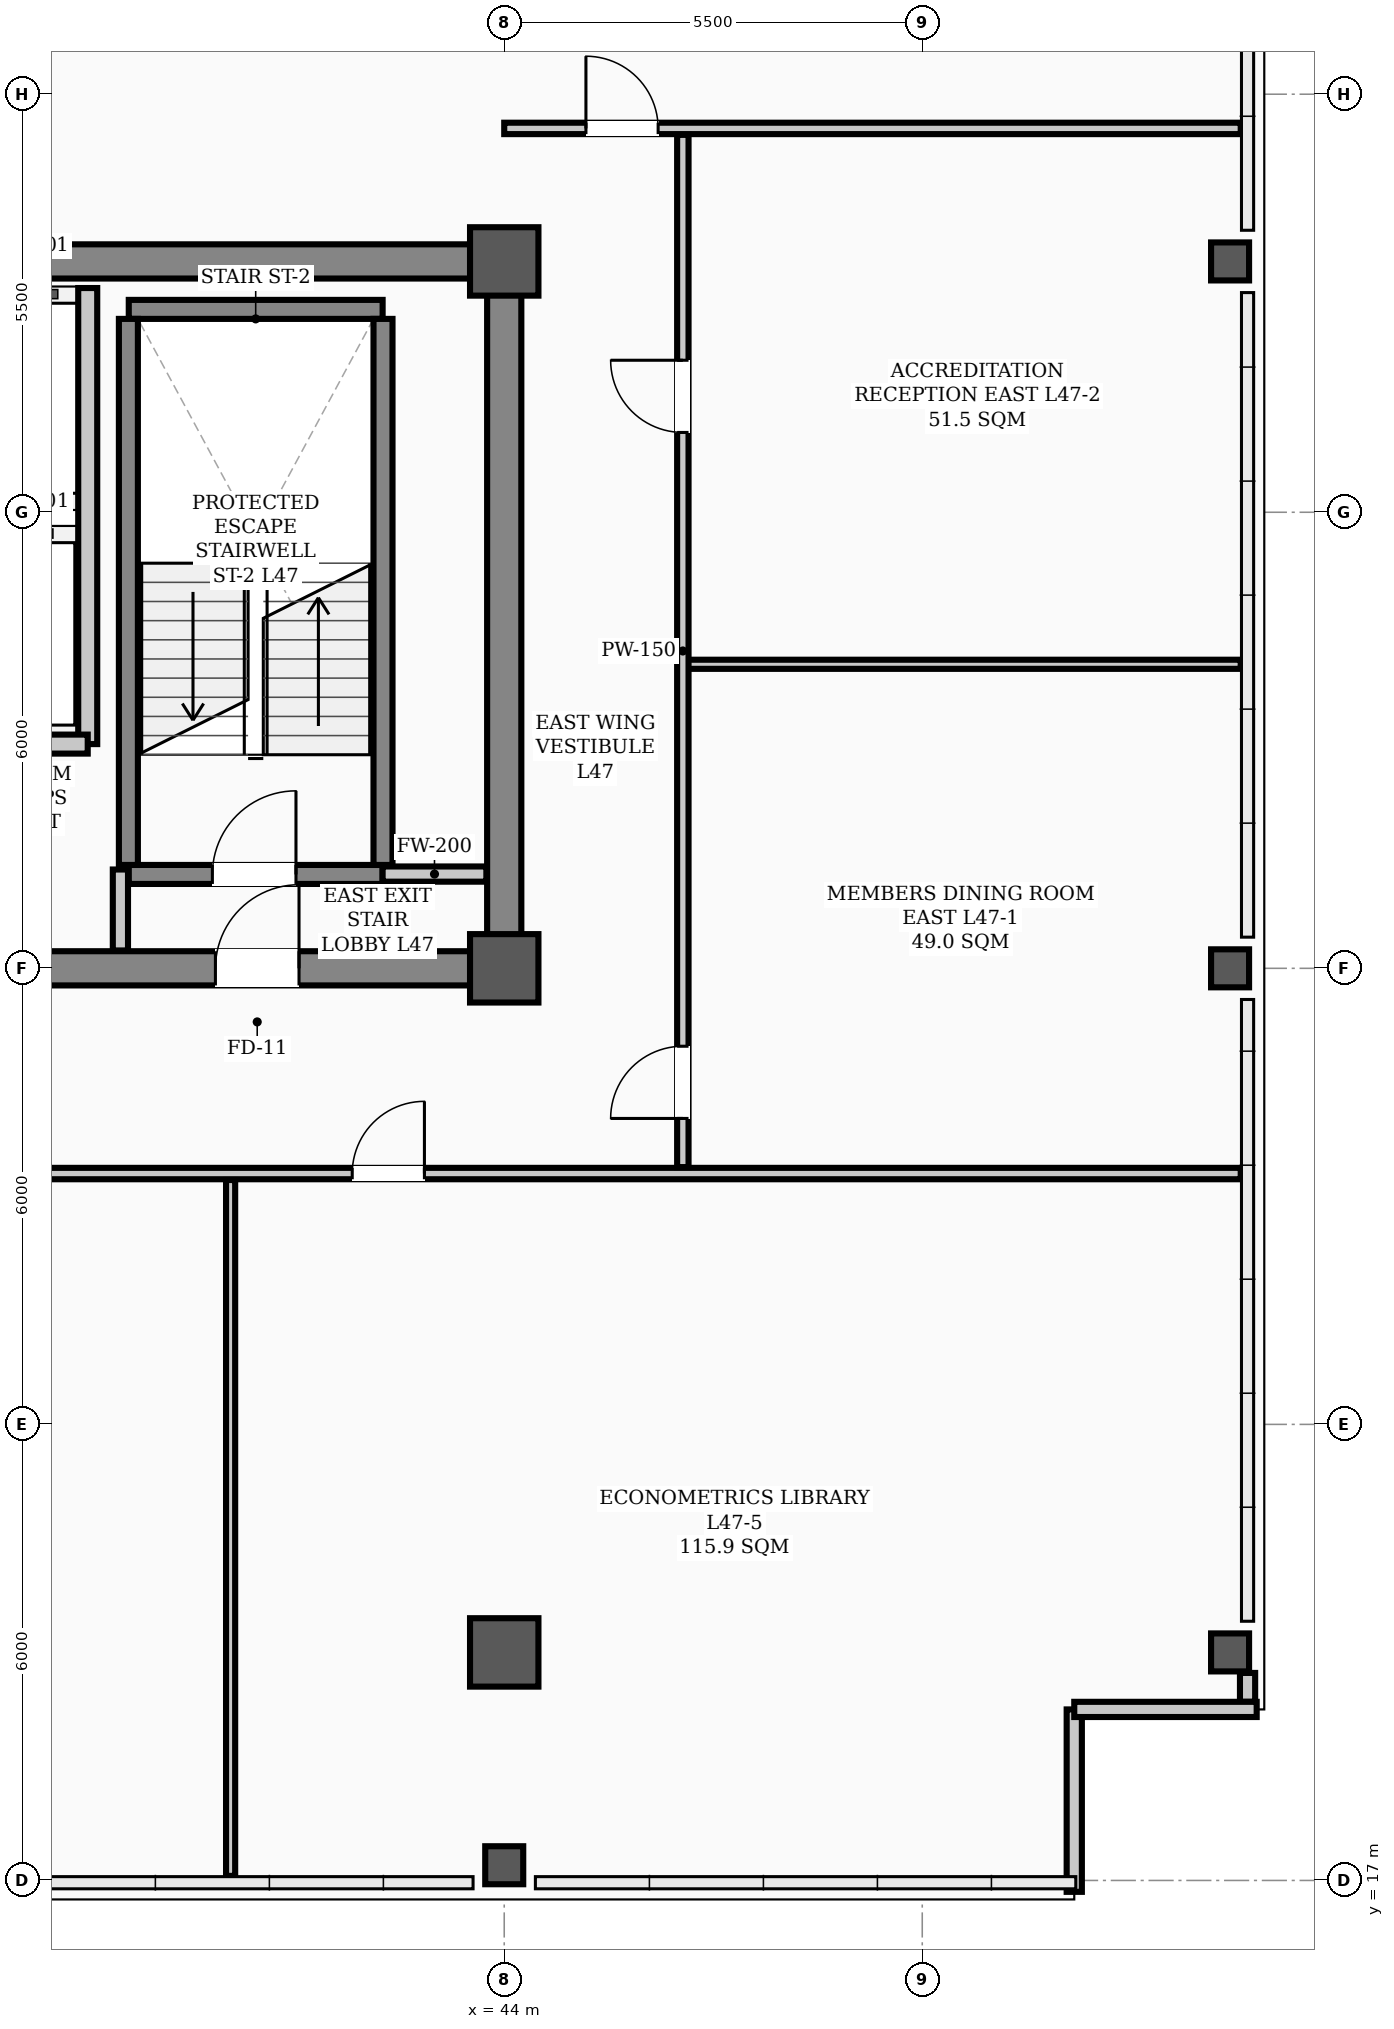
"""IFC4 building model, lengths in metres.
Left out: names, types, materials, properties, quantities, classifications, styles, units other than length and angle.
Written with IfcOpenShell. Run it as: python <this file> out.ifc"""

import sys

from ifc_helpers import new_model, si_unit, direction, frame, frame_2d, origin, origin_2d, place, context, subcontext, project, spatial, rectangle, hollow_rectangle, extrude, element, fill, save


model = new_model("IFC4")
c1 = context("Model", 3, precision=1e-05, world=origin(), true_north=direction((0.0, 1.0)))
c2 = subcontext(c1, "Body", "Model", "MODEL_VIEW")
j1 = project(units=[si_unit("LENGTHUNIT", "METRE"), si_unit("PLANEANGLEUNIT", "RADIAN")], contexts=[c1])
p1 = place(None, origin())
s1 = spatial("IfcSite", under=j1, at=p1, CompositionType="ELEMENT")
p2 = place(p1, origin())
s2 = spatial("IfcBuilding", under=s1, at=p2, CompositionType="ELEMENT")
p3 = place(p2, frame((0.0, 0.0, 189.0)))
s3 = spatial("IfcBuildingStorey", under=s2, at=p3, CompositionType="ELEMENT", Elevation=189.0)
for number, where, z_axis, x_axis in (
    (1, (44.0, 29.0, 0.0), (0.0, 0.0, 1.0), (1.0, 0.0, 0.0)),
    (2, (44.0, 38.3, 0.0), (0.0, 0.0, 1.0), (1.0, 0.0, 0.0)),
    (3, (44.0, 20.0, 0.0), (0.0, 0.0, 1.0), (1.0, 0.0, 0.0)),
):
    element("IfcColumn", number, at=place(p3, frame(where, z_axis=z_axis, x_axis=x_axis)), inside=s3, PredefinedType="COLUMN", context=c2, shape_type="SweptSolid", body=[
        extrude(hollow_rectangle(XDim=0.9, YDim=0.9, WallThickness=0.035, InnerFilletRadius=0.017, OuterFilletRadius=0.052, at=origin_2d()), origin(), (0.0, 0.0, 1.0), 3.9),
    ])
for number, where, z_axis, x_axis in (
    (4, (44.0, 17.2, 0.0), (0.0, 0.0, 1.0), (1.0, 0.0, 0.0)),
    (5, (53.55, 20.0, 0.0), (0.0, 0.0, 1.0), (1.0, 0.0, 0.0)),
    (6, (53.55, 29.0, 0.0), (0.0, 0.0, 1.0), (1.0, 0.0, 0.0)),
    (7, (53.55, 38.3, 0.0), (0.0, 0.0, 1.0), (1.0, 0.0, 0.0)),
):
    element("IfcColumn", number, at=place(p3, frame(where, z_axis=z_axis, x_axis=x_axis)), inside=s3, PredefinedType="COLUMN", context=c2, shape_type="SweptSolid", body=[
        extrude(hollow_rectangle(XDim=0.5, YDim=0.5, WallThickness=0.024, InnerFilletRadius=0.012, OuterFilletRadius=0.036, at=origin_2d()), origin(), (0.0, 0.0, 1.0), 3.9),
    ])
p4 = place(p3, frame((53.78, 19.35, 0.0), z_axis=(0.0, 0.0, 1.0), x_axis=(0.0, 1.0, 0.0)))
e8 = element("IfcWall", 8, at=p4, inside=s3, PredefinedType="PARAPET", context=c2, shape_type="SweptSolid", body=[
    extrude(rectangle(XDim=0.38, YDim=0.2, at=frame_2d((0.19, 0.0))), origin(), (0.0, 0.0, 1.0), 1.2),
])
for number, where, z_axis, x_axis in (
    (9, (51.5, 16.85, 0.0), (0.0, 0.0, 1.0), (0.0, 1.0, 0.0)),
    (10, (51.5, 19.25, 0.0), (0.0, 0.0, 1.0), (1.0, 0.0, 0.0)),
):
    element("IfcWall", number, at=place(p3, frame(where, z_axis=z_axis, x_axis=x_axis)), inside=s3, PredefinedType="PARAPET", context=c2, shape_type="SweptSolid", body=[
        extrude(rectangle(XDim=2.4, YDim=0.2, at=frame_2d((1.2, 0.0))), origin(), (0.0, 0.0, 1.0), 1.2),
    ])
p5 = place(p3, frame((13.5, 29.0, 0.0), z_axis=(0.0, 0.0, 1.0), x_axis=(1.0, 0.0, 0.0)))
e11 = element("IfcWall", 11, at=p5, inside=s3, PredefinedType="SHEAR", context=c2, shape_type="SweptSolid", body=[
    extrude(rectangle(XDim=30.5, YDim=0.45, at=frame_2d((15.25, 0.0))), origin(), (0.0, 0.0, 1.0), 3.72),
])
p6 = place(p5, frame((1.75, 0.0, 0.0)))
e12 = element("IfcOpeningElement", 12, at=p6, cuts=e11, PredefinedType="OPENING", context=c2, shape_type="SweptSolid", body=[
    extrude(rectangle(XDim=1.1, YDim=2.08, at=frame_2d((0.55, 1.04))), frame((0.0, 0.235, 0.0), z_axis=(0.0, -1.0, 0.0), x_axis=(1.0, 0.0, 0.0)), (0.0, 0.0, 1.0), 0.47),
])
p7 = place(p5, frame((26.7, 0.0, 0.0)))
e13 = element("IfcOpeningElement", 13, at=p7, cuts=e11, PredefinedType="OPENING", context=c2, shape_type="SweptSolid", body=[
    extrude(rectangle(XDim=1.1, YDim=2.08, at=frame_2d((0.55, 1.04))), frame((0.0, 0.235, 0.0), z_axis=(0.0, -1.0, 0.0), x_axis=(1.0, 0.0, 0.0)), (0.0, 0.0, 1.0), 0.47),
])
p8 = place(p5, frame((6.8, 0.0, 0.0)))
e14 = element("IfcOpeningElement", 14, at=p8, cuts=e11, PredefinedType="OPENING", context=c2, shape_type="SweptSolid", body=[
    extrude(rectangle(XDim=1.1, YDim=2.08, at=frame_2d((0.55, 1.04))), frame((0.0, 0.235, 0.0), z_axis=(0.0, -1.0, 0.0), x_axis=(1.0, 0.0, 0.0)), (0.0, 0.0, 1.0), 0.47),
])
p9 = place(p5, frame((13.2, 0.0, 0.0)))
e15 = element("IfcOpeningElement", 15, at=p9, cuts=e11, PredefinedType="OPENING", context=c2, shape_type="SweptSolid", body=[
    extrude(rectangle(XDim=1.6, YDim=2.08, at=frame_2d((0.8, 1.04))), frame((0.0, 0.235, 0.0), z_axis=(0.0, -1.0, 0.0), x_axis=(1.0, 0.0, 0.0)), (0.0, 0.0, 1.0), 0.47),
])
p10 = place(p5, frame((19.6, 0.0, 0.0)))
e16 = element("IfcOpeningElement", 16, at=p10, cuts=e11, PredefinedType="OPENING", context=c2, shape_type="SweptSolid", body=[
    extrude(rectangle(XDim=0.9, YDim=2.08, at=frame_2d((0.45, 1.04))), frame((0.0, 0.235, 0.0), z_axis=(0.0, -1.0, 0.0), x_axis=(1.0, 0.0, 0.0)), (0.0, 0.0, 1.0), 0.47),
])
p11 = place(p5, frame((21.6, 0.0, 0.0)))
e17 = element("IfcOpeningElement", 17, at=p11, cuts=e11, PredefinedType="OPENING", context=c2, shape_type="SweptSolid", body=[
    extrude(rectangle(XDim=0.9, YDim=2.08, at=frame_2d((0.45, 1.04))), frame((0.0, 0.235, 0.0), z_axis=(0.0, -1.0, 0.0), x_axis=(1.0, 0.0, 0.0)), (0.0, 0.0, 1.0), 0.47),
])
p12 = place(p3, frame((13.5, 38.3, 0.0), z_axis=(0.0, 0.0, 1.0), x_axis=(1.0, 0.0, 0.0)))
e18 = element("IfcWall", 18, at=p12, inside=s3, PredefinedType="SHEAR", context=c2, shape_type="SweptSolid", body=[
    extrude(rectangle(XDim=30.5, YDim=0.45, at=frame_2d((15.25, 0.0))), origin(), (0.0, 0.0, 1.0), 3.72),
])
p13 = place(p3, frame((44.0, 29.35, 0.0), z_axis=(0.0, 0.0, 1.0), x_axis=(0.0, 1.0, 0.0)))
e19 = element("IfcWall", 19, at=p13, inside=s3, PredefinedType="SHEAR", context=c2, shape_type="SweptSolid", body=[
    extrude(rectangle(XDim=8.6, YDim=0.45, at=frame_2d((4.3, 0.0))), origin(), (0.0, 0.0, 1.0), 3.72),
])
p14 = place(p3, frame((39.06, 30.235, 0.0), z_axis=(0.0, 0.0, 1.0), x_axis=(1.0, 0.0, 0.0)))
e20 = element("IfcWall", 20, at=p14, inside=s3, PredefinedType="STANDARD", context=c2, shape_type="SweptSolid", body=[
    extrude(rectangle(XDim=3.34, YDim=0.25, at=frame_2d((1.67, 0.0))), origin(), (0.0, 0.0, 1.0), 3.72),
])
p15 = place(p14, frame((1.1, 0.0, 0.0)))
e21 = element("IfcOpeningElement", 21, at=p15, cuts=e20, PredefinedType="OPENING", context=c2, shape_type="SweptSolid", body=[
    extrude(rectangle(XDim=1.1, YDim=2.08, at=frame_2d((0.55, 1.04))), frame((0.0, 0.135, 0.0), z_axis=(0.0, -1.0, 0.0), x_axis=(1.0, 0.0, 0.0)), (0.0, 0.0, 1.0), 0.27),
])
p16 = place(p3, frame((39.06, 37.669, 0.0), z_axis=(0.0, 0.0, 1.0), x_axis=(1.0, 0.0, 0.0)))
e22 = element("IfcWall", 22, at=p16, inside=s3, PredefinedType="STANDARD", context=c2, shape_type="SweptSolid", body=[
    extrude(rectangle(XDim=3.34, YDim=0.25, at=frame_2d((1.67, 0.0))), origin(), (0.0, 0.0, 1.0), 3.72),
])
for number, where, z_axis, x_axis in (
    (23, (39.055, 30.36, 0.0), (0.0, 0.0, 1.0), (0.0, 1.0, 0.0)),
    (24, (42.405, 30.36, 0.0), (0.0, 0.0, 1.0), (0.0, 1.0, 0.0)),
):
    element("IfcWall", number, at=place(p3, frame(where, z_axis=z_axis, x_axis=x_axis)), inside=s3, PredefinedType="STANDARD", context=c2, shape_type="SweptSolid", body=[
        extrude(rectangle(XDim=7.184, YDim=0.25, at=frame_2d((3.592, 0.0))), origin(), (0.0, 0.0, 1.0), 3.72),
    ])
p17 = place(p3, frame((38.52, 31.95, 0.0), z_axis=(0.0, 0.0, 1.0), x_axis=(0.0, 1.0, 0.0)))
e25 = element("IfcWall", 25, at=p17, inside=s3, PredefinedType="STANDARD", context=c2, shape_type="SweptSolid", body=[
    extrude(rectangle(XDim=6.0, YDim=0.25, at=frame_2d((3.0, 0.0))), origin(), (0.0, 0.0, 1.0), 3.35),
])
p18 = place(p3, frame((36.62, 31.95, 0.0), z_axis=(0.0, 0.0, 1.0), x_axis=(1.0, 0.0, 0.0)))
e26 = element("IfcWall", 26, at=p18, inside=s3, PredefinedType="STANDARD", context=c2, shape_type="SweptSolid", body=[
    extrude(rectangle(XDim=1.9, YDim=0.25, at=frame_2d((0.95, 0.0))), origin(), (0.0, 0.0, 1.0), 3.48),
])
p19 = place(p3, frame((42.4, 30.24, 0.0), z_axis=(0.0, 0.0, 1.0), x_axis=(1.0, 0.0, 0.0)))
e27 = element("IfcWall", 27, at=p19, inside=s3, PredefinedType="STANDARD", context=c2, shape_type="SweptSolid", body=[
    extrude(rectangle(XDim=1.365, YDim=0.2, at=frame_2d((0.683, 0.0))), origin(), (0.0, 0.0, 1.0), 3.2),
])
p20 = place(p3, frame((10.31, 26.3, 0.0), z_axis=(0.0, 0.0, 1.0), x_axis=(1.0, 0.0, 0.0)))
e28 = element("IfcWall", 28, at=p20, inside=s3, PredefinedType="PARTITIONING", context=c2, shape_type="SweptSolid", body=[
    extrude(rectangle(XDim=43.38, YDim=0.15, at=frame_2d((21.69, 0.0))), origin(), (0.0, 0.0, 1.0), 3.2),
])
p21 = place(p20, frame((0.97, 0.0, 0.0)))
e29 = element("IfcOpeningElement", 29, at=p21, cuts=e28, PredefinedType="OPENING", context=c2, shape_type="SweptSolid", body=[
    extrude(rectangle(XDim=0.95, YDim=2.08, at=frame_2d((0.475, 1.04))), frame((0.0, 0.085, 0.0), z_axis=(0.0, -1.0, 0.0), x_axis=(1.0, 0.0, 0.0)), (0.0, 0.0, 1.0), 0.17),
])
p22 = place(p20, frame((8.315, 0.0, 0.0)))
e30 = element("IfcOpeningElement", 30, at=p22, cuts=e28, PredefinedType="OPENING", context=c2, shape_type="SweptSolid", body=[
    extrude(rectangle(XDim=0.95, YDim=2.08, at=frame_2d((0.475, 1.04))), frame((0.0, 0.085, 0.0), z_axis=(0.0, -1.0, 0.0), x_axis=(1.0, 0.0, 0.0)), (0.0, 0.0, 1.0), 0.17),
])
p23 = place(p20, frame((16.815, 0.0, 0.0)))
e31 = element("IfcOpeningElement", 31, at=p23, cuts=e28, PredefinedType="OPENING", context=c2, shape_type="SweptSolid", body=[
    extrude(rectangle(XDim=0.95, YDim=2.08, at=frame_2d((0.475, 1.04))), frame((0.0, 0.085, 0.0), z_axis=(0.0, -1.0, 0.0), x_axis=(1.0, 0.0, 0.0)), (0.0, 0.0, 1.0), 0.17),
])
p24 = place(p20, frame((24.515, 0.0, 0.0)))
e32 = element("IfcOpeningElement", 32, at=p24, cuts=e28, PredefinedType="OPENING", context=c2, shape_type="SweptSolid", body=[
    extrude(rectangle(XDim=0.95, YDim=2.08, at=frame_2d((0.475, 1.04))), frame((0.0, 0.085, 0.0), z_axis=(0.0, -1.0, 0.0), x_axis=(1.0, 0.0, 0.0)), (0.0, 0.0, 1.0), 0.17),
])
p25 = place(p20, frame((31.69, 0.0, 0.0)))
e33 = element("IfcOpeningElement", 33, at=p25, cuts=e28, PredefinedType="OPENING", context=c2, shape_type="SweptSolid", body=[
    extrude(rectangle(XDim=0.95, YDim=2.08, at=frame_2d((0.475, 1.04))), frame((0.0, 0.085, 0.0), z_axis=(0.0, -1.0, 0.0), x_axis=(1.0, 0.0, 0.0)), (0.0, 0.0, 1.0), 0.17),
])
p26 = place(p3, frame((46.35, 33.0, 0.0), z_axis=(0.0, 0.0, 1.0), x_axis=(1.0, 0.0, 0.0)))
e34 = element("IfcWall", 34, at=p26, inside=s3, PredefinedType="PARTITIONING", context=c2, shape_type="SweptSolid", body=[
    extrude(rectangle(XDim=7.34, YDim=0.12, at=frame_2d((3.67, 0.0))), origin(), (0.0, 0.0, 1.0), 3.212),
])
p27 = place(p3, frame((44.0, 40.05, 0.0), z_axis=(0.0, 0.0, 1.0), x_axis=(1.0, 0.0, 0.0)))
e35 = element("IfcWall", 35, at=p27, inside=s3, PredefinedType="PARTITIONING", context=c2, shape_type="SweptSolid", body=[
    extrude(rectangle(XDim=9.69, YDim=0.15, at=frame_2d((4.845, 0.0))), origin(), (0.0, 0.0, 1.0), 3.2),
])
p28 = place(p27, frame((1.075, 0.0, 0.0)))
e36 = element("IfcOpeningElement", 36, at=p28, cuts=e35, PredefinedType="OPENING", context=c2, shape_type="SweptSolid", body=[
    extrude(rectangle(XDim=0.95, YDim=2.08, at=frame_2d((0.475, 1.04))), frame((0.0, 0.085, 0.0), z_axis=(0.0, -1.0, 0.0), x_axis=(1.0, 0.0, 0.0)), (0.0, 0.0, 1.0), 0.17),
])
p29 = place(p3, frame((38.95, 29.235, 0.0), z_axis=(0.0, 0.0, 1.0), x_axis=(0.0, 1.0, 0.0)))
e37 = element("IfcWall", 37, at=p29, inside=s3, PredefinedType="STANDARD", context=c2, shape_type="SweptSolid", body=[
    extrude(rectangle(XDim=1.065, YDim=0.2, at=frame_2d((0.532, 0.0))), origin(), (0.0, 0.0, 1.0), 3.35),
])
p30 = place(p3, frame((46.35, 26.385, 0.0), z_axis=(0.0, 0.0, 1.0), x_axis=(0.0, 1.0, 0.0)))
e38 = element("IfcWall", 38, at=p30, inside=s3, PredefinedType="PARTITIONING", context=c2, shape_type="SweptSolid", body=[
    extrude(rectangle(XDim=13.58, YDim=0.15, at=frame_2d((6.79, 0.0))), origin(), (0.0, 0.0, 1.0), 3.1),
])
p31 = place(p30, frame((0.64, 0.0, 0.0)))
e39 = element("IfcOpeningElement", 39, at=p31, cuts=e38, PredefinedType="OPENING", context=c2, shape_type="SweptSolid", body=[
    extrude(rectangle(XDim=0.95, YDim=2.08, at=frame_2d((0.475, 1.04))), frame((0.0, 0.085, 0.0), z_axis=(0.0, -1.0, 0.0), x_axis=(1.0, 0.0, 0.0)), (0.0, 0.0, 1.0), 0.17),
])
p32 = place(p30, frame((9.665, 0.0, 0.0)))
e40 = element("IfcOpeningElement", 40, at=p32, cuts=e38, PredefinedType="OPENING", context=c2, shape_type="SweptSolid", body=[
    extrude(rectangle(XDim=0.95, YDim=2.08, at=frame_2d((0.475, 1.04))), frame((0.0, 0.085, 0.0), z_axis=(0.0, -1.0, 0.0), x_axis=(1.0, 0.0, 0.0)), (0.0, 0.0, 1.0), 0.17),
])
p33 = place(p3, frame((40.4, 17.06, 0.0), z_axis=(0.0, 0.0, 1.0), x_axis=(0.0, 1.0, 0.0)))
e41 = element("IfcWall", 41, at=p33, inside=s3, PredefinedType="PARTITIONING", context=c2, shape_type="SweptSolid", body=[
    extrude(rectangle(XDim=9.155, YDim=0.12, at=frame_2d((4.578, 0.0))), origin(), (0.0, 0.0, 1.0), 3.1),
])
p34 = place(p15, origin())
e42 = element("IfcDoor", 42, at=p34, inside=s3, OperationType="SINGLE_SWING_RIGHT", PredefinedType="DOOR", context=c2, shape_type="SweptSolid", body=[
    extrude(rectangle(XDim=1.1, YDim=2.08, at=frame_2d((0.55, 1.04))), frame((0.0, 0.025, 0.0), z_axis=(0.0, -1.0, 0.0), x_axis=(1.0, 0.0, 0.0)), (0.0, 0.0, 1.0), 0.05),
])
fill(e21, e42)
p35 = place(p7, origin())
e43 = element("IfcDoor", 43, at=p35, inside=s3, OperationType="SINGLE_SWING_RIGHT", PredefinedType="DOOR", context=c2, shape_type="SweptSolid", body=[
    extrude(rectangle(XDim=1.1, YDim=2.08, at=frame_2d((0.55, 1.04))), frame((0.0, 0.025, 0.0), z_axis=(0.0, -1.0, 0.0), x_axis=(1.0, 0.0, 0.0)), (0.0, 0.0, 1.0), 0.05),
])
fill(e13, e43)
p36 = place(p25, origin())
e44 = element("IfcDoor", 44, at=p36, inside=s3, OperationType="SINGLE_SWING_RIGHT", PredefinedType="DOOR", context=c2, shape_type="SweptSolid", body=[
    extrude(rectangle(XDim=0.95, YDim=2.08, at=frame_2d((0.475, 1.04))), frame((0.0, 0.025, 0.0), z_axis=(0.0, -1.0, 0.0), x_axis=(1.0, 0.0, 0.0)), (0.0, 0.0, 1.0), 0.05),
])
fill(e33, e44)
p37 = place(p31, origin())
e45 = element("IfcDoor", 45, at=p37, inside=s3, OperationType="SINGLE_SWING_LEFT", PredefinedType="DOOR", context=c2, shape_type="SweptSolid", body=[
    extrude(rectangle(XDim=0.95, YDim=2.08, at=frame_2d((0.475, 1.04))), frame((0.0, 0.025, 0.0), z_axis=(0.0, -1.0, 0.0), x_axis=(1.0, 0.0, 0.0)), (0.0, 0.0, 1.0), 0.05),
])
fill(e39, e45)
p38 = place(p32, origin())
e46 = element("IfcDoor", 46, at=p38, inside=s3, OperationType="SINGLE_SWING_RIGHT", PredefinedType="DOOR", context=c2, shape_type="SweptSolid", body=[
    extrude(rectangle(XDim=0.95, YDim=2.08, at=frame_2d((0.475, 1.04))), frame((0.0, 0.025, 0.0), z_axis=(0.0, -1.0, 0.0), x_axis=(1.0, 0.0, 0.0)), (0.0, 0.0, 1.0), 0.05),
])
fill(e40, e46)
p39 = place(p28, origin())
e47 = element("IfcDoor", 47, at=p39, inside=s3, OperationType="SINGLE_SWING_LEFT", PredefinedType="DOOR", context=c2, shape_type="SweptSolid", body=[
    extrude(rectangle(XDim=0.95, YDim=2.08, at=frame_2d((0.475, 1.04))), frame((0.0, 0.025, 0.0), z_axis=(0.0, -1.0, 0.0), x_axis=(1.0, 0.0, 0.0)), (0.0, 0.0, 1.0), 0.05),
])
fill(e36, e47)
save(model, sys.argv[1])
